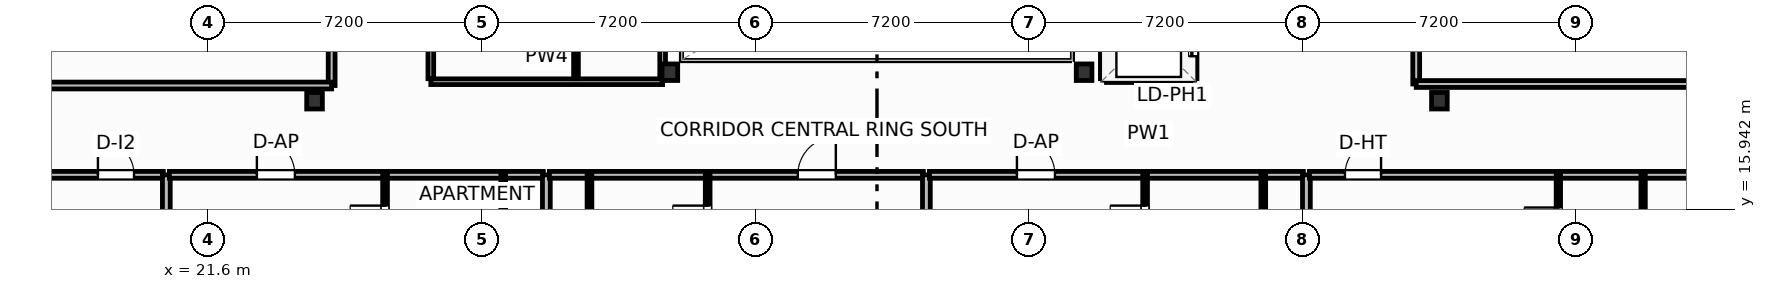
"""IFC4 building model, lengths in metres.
Left out: names, types, materials, properties, quantities, classifications, styles, units other than length and angle.
Written with IfcOpenShell. Run it as: python <this file> out.ifc"""

import sys

from ifc_helpers import new_model, si_unit, direction, frame, frame_2d, origin, origin_2d, place, context, subcontext, project, spatial, rectangle, i_section, extrude, element, fill, save


model = new_model("IFC4")
c1 = context("Model", 3, precision=1e-05, world=origin(), true_north=direction((0.0, 1.0)))
c2 = subcontext(c1, "Body", "Model", "MODEL_VIEW")
j1 = project(units=[si_unit("LENGTHUNIT", "METRE"), si_unit("PLANEANGLEUNIT", "RADIAN")], contexts=[c1])
p1 = place(None, origin())
s1 = spatial("IfcSite", under=j1, at=p1, CompositionType="ELEMENT")
p2 = place(p1, origin())
s2 = spatial("IfcBuilding", under=s1, at=p2, CompositionType="ELEMENT")
p3 = place(p2, frame((0.0, 0.0, 212.7)))
s3 = spatial("IfcBuildingStorey", under=s2, at=p3, CompositionType="ELEMENT", Elevation=212.7)
for number, where, z_axis, x_axis in (
    (1, (33.75, 19.55, 0.0), (0.0, 0.0, 1.0), (1.0, 0.0, 0.0)),
    (2, (44.65, 19.55, 0.0), (0.0, 0.0, 1.0), (1.0, 0.0, 0.0)),
    (3, (24.4, 18.8, 0.0), (0.0, 0.0, 1.0), (1.0, 0.0, 0.0)),
    (4, (54.0, 18.8, 0.0), (0.0, 0.0, 1.0), (1.0, 0.0, 0.0)),
):
    element("IfcColumn", number, at=place(p3, frame(where, z_axis=z_axis, x_axis=x_axis)), inside=s3, PredefinedType="COLUMN", context=c2, shape_type="SweptSolid", body=[
        extrude(i_section(OverallWidth=0.412, OverallDepth=0.435, WebThickness=0.036, FlangeThickness=0.057, FilletRadius=0.025, at=origin_2d()), origin(), (0.0, 0.0, 1.0), 3.7),
    ])
p4 = place(p3, frame((56.219, 9.845, 0.0), z_axis=(0.0, 0.0, 1.0), x_axis=(0.935225601791, 0.354052360188, 0.0)))
e5 = element("IfcWall", 5, at=p4, inside=s3, PredefinedType="SOLIDWALL", context=c2, shape_type="SweptSolid", body=[
    extrude(rectangle(XDim=17.647, YDim=0.22, at=frame_2d((8.824, 0.0))), origin(), (0.0, 0.0, 1.0), 2.73),
])
p5 = place(p4, frame((7.774, 0.0, 0.8)))
e6 = element("IfcOpeningElement", 6, at=p5, cuts=e5, PredefinedType="OPENING", context=c2, shape_type="SweptSolid", body=[
    extrude(rectangle(XDim=2.1, YDim=1.75, at=frame_2d((1.05, 0.875))), frame((0.0, 0.12, 0.0), z_axis=(0.0, -1.0, 0.0), x_axis=(1.0, 0.0, 0.0)), (0.0, 0.0, 1.0), 0.24),
])
p6 = place(p3, frame((7.196, 16.85, 0.0), z_axis=(0.0, 0.0, 1.0), x_axis=(1.0, 0.0, 0.0)))
e7 = element("IfcWall", 7, at=p6, inside=s3, PredefinedType="PARTITIONING", context=c2, shape_type="SweptSolid", body=[
    extrude(rectangle(XDim=13.224, YDim=0.18, at=frame_2d((6.612, 0.0))), origin(), (0.0, 0.0, 1.0), 3.45),
])
p7 = place(p6, frame((11.504, 0.0, 0.0)))
e8 = element("IfcOpeningElement", 8, at=p7, cuts=e7, PredefinedType="OPENING", context=c2, shape_type="SweptSolid", body=[
    extrude(rectangle(XDim=0.95, YDim=2.05, at=frame_2d((0.475, 1.025))), frame((0.0, 0.1, 0.0), z_axis=(0.0, -1.0, 0.0), x_axis=(1.0, 0.0, 0.0)), (0.0, 0.0, 1.0), 0.2),
])
p8 = place(p3, frame((20.5, -3.657, 0.0), z_axis=(0.0, 0.0, 1.0), x_axis=(0.0, 1.0, 0.0)))
e9 = element("IfcWall", 9, at=p8, inside=s3, PredefinedType="PARTITIONING", context=c2, shape_type="SweptSolid", body=[
    extrude(rectangle(XDim=20.507, YDim=0.205, at=frame_2d((10.253, 0.0))), origin(), (0.0, 0.0, 1.0), 3.45),
])
p9 = place(p3, frame((20.58, 16.85, 0.0), z_axis=(0.0, 0.0, 1.0), x_axis=(1.0, 0.0, 0.0)))
e10 = element("IfcWall", 10, at=p9, inside=s3, PredefinedType="PARTITIONING", context=c2, shape_type="SweptSolid", body=[
    extrude(rectangle(XDim=9.84, YDim=0.18, at=frame_2d((4.92, 0.0))), origin(), (0.0, 0.0, 1.0), 3.45),
])
p10 = place(p9, frame((2.302, 0.0, 0.0)))
e11 = element("IfcOpeningElement", 11, at=p10, cuts=e10, PredefinedType="OPENING", context=c2, shape_type="SweptSolid", body=[
    extrude(rectangle(XDim=1.0, YDim=2.2, at=frame_2d((0.5, 1.1))), frame((0.0, 0.1, 0.0), z_axis=(0.0, -1.0, 0.0), x_axis=(1.0, 0.0, 0.0)), (0.0, 0.0, 1.0), 0.2),
])
p11 = place(p3, frame((26.255, -1.478, 0.0), z_axis=(0.0, 0.0, 1.0), x_axis=(0.0, 1.0, 0.0)))
e12 = element("IfcWall", 12, at=p11, inside=s3, PredefinedType="PARTITIONING", context=c2, shape_type="SweptSolid", body=[
    extrude(rectangle(XDim=18.328, YDim=0.125, at=frame_2d((9.164, 0.0))), origin(), (0.0, 0.0, 1.0), 2.739),
])
p12 = place(p11, frame((6.319, 0.0, 0.0)))
e13 = element("IfcOpeningElement", 13, at=p12, cuts=e12, PredefinedType="OPENING", context=c2, shape_type="SweptSolid", body=[
    extrude(rectangle(XDim=0.92, YDim=2.05, at=frame_2d((0.46, 1.025))), frame((0.0, 0.073, 0.0), z_axis=(0.0, -1.0, 0.0), x_axis=(1.0, 0.0, 0.0)), (0.0, 0.0, 1.0), 0.145),
])
p13 = place(p11, frame((14.305, 0.0, 0.0)))
e14 = element("IfcOpeningElement", 14, at=p13, cuts=e12, PredefinedType="OPENING", context=c2, shape_type="SweptSolid", body=[
    extrude(rectangle(XDim=0.9, YDim=2.05, at=frame_2d((0.45, 1.025))), frame((0.0, 0.073, 0.0), z_axis=(0.0, -1.0, 0.0), x_axis=(1.0, 0.0, 0.0)), (0.0, 0.0, 1.0), 0.145),
])
p14 = place(p11, frame((16.598, 0.0, 0.0)))
e15 = element("IfcOpeningElement", 15, at=p14, cuts=e12, PredefinedType="OPENING", context=c2, shape_type="SweptSolid", body=[
    extrude(rectangle(XDim=0.92, YDim=2.05, at=frame_2d((0.46, 1.025))), frame((0.0, 0.073, 0.0), z_axis=(0.0, -1.0, 0.0), x_axis=(1.0, 0.0, 0.0)), (0.0, 0.0, 1.0), 0.145),
])
p15 = place(p3, frame((29.365, 14.44, 0.0), z_axis=(0.0, 0.0, 1.0), x_axis=(0.0, 1.0, 0.0)))
e16 = element("IfcWall", 16, at=p15, inside=s3, PredefinedType="PARTITIONING", context=c2, shape_type="SweptSolid", body=[
    extrude(rectangle(XDim=2.41, YDim=0.125, at=frame_2d((1.205, 0.0))), origin(), (0.0, 0.0, 1.0), 3.45),
])
p16 = place(p3, frame((30.5, 0.129, 0.0), z_axis=(0.0, 0.0, 1.0), x_axis=(0.0, 1.0, 0.0)))
e17 = element("IfcWall", 17, at=p16, inside=s3, PredefinedType="PARTITIONING", context=c2, shape_type="SweptSolid", body=[
    extrude(rectangle(XDim=16.721, YDim=0.205, at=frame_2d((8.36, 0.0))), origin(), (0.0, 0.0, 1.0), 3.45),
])
p17 = place(p3, frame((30.58, 16.85, 0.0), z_axis=(0.0, 0.0, 1.0), x_axis=(1.0, 0.0, 0.0)))
e18 = element("IfcWall", 18, at=p17, inside=s3, PredefinedType="PARTITIONING", context=c2, shape_type="SweptSolid", body=[
    extrude(rectangle(XDim=9.84, YDim=0.18, at=frame_2d((4.92, 0.0))), origin(), (0.0, 0.0, 1.0), 3.45),
])
p18 = place(p17, frame((6.537, 0.0, 0.0)))
e19 = element("IfcOpeningElement", 19, at=p18, cuts=e18, PredefinedType="OPENING", context=c2, shape_type="SweptSolid", body=[
    extrude(rectangle(XDim=1.0, YDim=2.2, at=frame_2d((0.5, 1.1))), frame((0.0, 0.1, 0.0), z_axis=(0.0, -1.0, 0.0), x_axis=(1.0, 0.0, 0.0)), (0.0, 0.0, 1.0), 0.2),
])
p19 = place(p3, frame((34.745, 1.736, 0.0), z_axis=(0.0, 0.0, 1.0), x_axis=(0.0, 1.0, 0.0)))
e20 = element("IfcWall", 20, at=p19, inside=s3, PredefinedType="PARTITIONING", context=c2, shape_type="SweptSolid", body=[
    extrude(rectangle(XDim=15.114, YDim=0.125, at=frame_2d((7.557, 0.0))), origin(), (0.0, 0.0, 1.0), 2.739),
])
p20 = place(p19, frame((4.712, 0.0, 0.0)))
e21 = element("IfcOpeningElement", 21, at=p20, cuts=e20, PredefinedType="OPENING", context=c2, shape_type="SweptSolid", body=[
    extrude(rectangle(XDim=0.92, YDim=2.05, at=frame_2d((0.46, 1.025))), frame((0.0, 0.073, 0.0), z_axis=(0.0, -1.0, 0.0), x_axis=(1.0, 0.0, 0.0)), (0.0, 0.0, 1.0), 0.145),
])
p21 = place(p19, frame((11.091, 0.0, 0.0)))
e22 = element("IfcOpeningElement", 22, at=p21, cuts=e20, PredefinedType="OPENING", context=c2, shape_type="SweptSolid", body=[
    extrude(rectangle(XDim=0.9, YDim=2.05, at=frame_2d((0.45, 1.025))), frame((0.0, 0.073, 0.0), z_axis=(0.0, -1.0, 0.0), x_axis=(1.0, 0.0, 0.0)), (0.0, 0.0, 1.0), 0.145),
])
p22 = place(p19, frame((13.384, 0.0, 0.0)))
e23 = element("IfcOpeningElement", 23, at=p22, cuts=e20, PredefinedType="OPENING", context=c2, shape_type="SweptSolid", body=[
    extrude(rectangle(XDim=0.92, YDim=2.05, at=frame_2d((0.46, 1.025))), frame((0.0, 0.073, 0.0), z_axis=(0.0, -1.0, 0.0), x_axis=(1.0, 0.0, 0.0)), (0.0, 0.0, 1.0), 0.145),
])
p23 = place(p3, frame((31.635, 14.44, 0.0), z_axis=(0.0, 0.0, 1.0), x_axis=(0.0, 1.0, 0.0)))
e24 = element("IfcWall", 24, at=p23, inside=s3, PredefinedType="PARTITIONING", context=c2, shape_type="SweptSolid", body=[
    extrude(rectangle(XDim=2.41, YDim=0.125, at=frame_2d((1.205, 0.0))), origin(), (0.0, 0.0, 1.0), 3.45),
])
p24 = place(p3, frame((40.5, 6.16, 0.0), z_axis=(0.0, 0.0, 1.0), x_axis=(0.0, 1.0, 0.0)))
e25 = element("IfcWall", 25, at=p24, inside=s3, PredefinedType="PARTITIONING", context=c2, shape_type="SweptSolid", body=[
    extrude(rectangle(XDim=10.69, YDim=0.205, at=frame_2d((5.345, 0.0))), origin(), (0.0, 0.0, 1.0), 3.45),
])
p25 = place(p3, frame((40.58, 16.85, 0.0), z_axis=(0.0, 0.0, 1.0), x_axis=(1.0, 0.0, 0.0)))
e26 = element("IfcWall", 26, at=p25, inside=s3, PredefinedType="PARTITIONING", context=c2, shape_type="SweptSolid", body=[
    extrude(rectangle(XDim=9.84, YDim=0.18, at=frame_2d((4.92, 0.0))), origin(), (0.0, 0.0, 1.0), 3.45),
])
p26 = place(p25, frame((2.302, 0.0, 0.0)))
e27 = element("IfcOpeningElement", 27, at=p26, cuts=e26, PredefinedType="OPENING", context=c2, shape_type="SweptSolid", body=[
    extrude(rectangle(XDim=1.0, YDim=2.2, at=frame_2d((0.5, 1.1))), frame((0.0, 0.1, 0.0), z_axis=(0.0, -1.0, 0.0), x_axis=(1.0, 0.0, 0.0)), (0.0, 0.0, 1.0), 0.2),
])
p27 = place(p3, frame((46.255, 6.094, 0.0), z_axis=(0.0, 0.0, 1.0), x_axis=(0.0, 1.0, 0.0)))
e28 = element("IfcWall", 28, at=p27, inside=s3, PredefinedType="PARTITIONING", context=c2, shape_type="SweptSolid", body=[
    extrude(rectangle(XDim=10.756, YDim=0.125, at=frame_2d((5.378, 0.0))), origin(), (0.0, 0.0, 1.0), 3.45),
])
p28 = place(p27, frame((3.003, 0.0, 0.0)))
e29 = element("IfcOpeningElement", 29, at=p28, cuts=e28, PredefinedType="OPENING", context=c2, shape_type="SweptSolid", body=[
    extrude(rectangle(XDim=0.92, YDim=2.05, at=frame_2d((0.46, 1.025))), frame((0.0, 0.073, 0.0), z_axis=(0.0, -1.0, 0.0), x_axis=(1.0, 0.0, 0.0)), (0.0, 0.0, 1.0), 0.145),
])
p29 = place(p27, frame((6.733, 0.0, 0.0)))
e30 = element("IfcOpeningElement", 30, at=p29, cuts=e28, PredefinedType="OPENING", context=c2, shape_type="SweptSolid", body=[
    extrude(rectangle(XDim=0.9, YDim=2.05, at=frame_2d((0.45, 1.025))), frame((0.0, 0.073, 0.0), z_axis=(0.0, -1.0, 0.0), x_axis=(1.0, 0.0, 0.0)), (0.0, 0.0, 1.0), 0.145),
])
p30 = place(p27, frame((9.026, 0.0, 0.0)))
e31 = element("IfcOpeningElement", 31, at=p30, cuts=e28, PredefinedType="OPENING", context=c2, shape_type="SweptSolid", body=[
    extrude(rectangle(XDim=0.92, YDim=2.05, at=frame_2d((0.46, 1.025))), frame((0.0, 0.073, 0.0), z_axis=(0.0, -1.0, 0.0), x_axis=(1.0, 0.0, 0.0)), (0.0, 0.0, 1.0), 0.145),
])
p31 = place(p3, frame((49.365, 14.44, 0.0), z_axis=(0.0, 0.0, 1.0), x_axis=(0.0, 1.0, 0.0)))
e32 = element("IfcWall", 32, at=p31, inside=s3, PredefinedType="PARTITIONING", context=c2, shape_type="SweptSolid", body=[
    extrude(rectangle(XDim=2.41, YDim=0.125, at=frame_2d((1.205, 0.0))), origin(), (0.0, 0.0, 1.0), 3.45),
])
p32 = place(p3, frame((50.5, 9.946, 0.0), z_axis=(0.0, 0.0, 1.0), x_axis=(0.0, 1.0, 0.0)))
e33 = element("IfcWall", 33, at=p32, inside=s3, PredefinedType="PARTITIONING", context=c2, shape_type="SweptSolid", body=[
    extrude(rectangle(XDim=6.904, YDim=0.205, at=frame_2d((3.452, 0.0))), origin(), (0.0, 0.0, 1.0), 3.45),
])
p33 = place(p3, frame((50.58, 16.85, 0.0), z_axis=(0.0, 0.0, 1.0), x_axis=(1.0, 0.0, 0.0)))
e34 = element("IfcWall", 34, at=p33, inside=s3, PredefinedType="PARTITIONING", context=c2, shape_type="SweptSolid", body=[
    extrude(rectangle(XDim=23.404, YDim=0.18, at=frame_2d((11.702, 0.0))), origin(), (0.0, 0.0, 1.0), 3.45),
])
p34 = place(p33, frame((0.935, 0.0, 0.0)))
e35 = element("IfcOpeningElement", 35, at=p34, cuts=e34, PredefinedType="OPENING", context=c2, shape_type="SweptSolid", body=[
    extrude(rectangle(XDim=0.95, YDim=2.15, at=frame_2d((0.475, 1.075))), frame((0.0, 0.1, 0.0), z_axis=(0.0, -1.0, 0.0), x_axis=(1.0, 0.0, 0.0)), (0.0, 0.0, 1.0), 0.2),
])
p35 = place(p3, frame((57.13, 14.33, 0.0), z_axis=(0.0, 0.0, 1.0), x_axis=(0.0, 1.0, 0.0)))
e36 = element("IfcWall", 36, at=p35, inside=s3, PredefinedType="PARTITIONING", context=c2, shape_type="SweptSolid", body=[
    extrude(rectangle(XDim=2.52, YDim=0.115, at=frame_2d((1.26, 0.0))), origin(), (0.0, 0.0, 1.0), 3.45),
])
p36 = place(p35, frame((0.76, 0.0, 0.0)))
e37 = element("IfcOpeningElement", 37, at=p36, cuts=e36, PredefinedType="OPENING", context=c2, shape_type="SweptSolid", body=[
    extrude(rectangle(XDim=0.9, YDim=2.05, at=frame_2d((0.45, 1.025))), frame((0.0, 0.067, 0.0), z_axis=(0.0, -1.0, 0.0), x_axis=(1.0, 0.0, 0.0)), (0.0, 0.0, 1.0), 0.135),
])
p37 = place(p3, frame((59.36, 14.33, 0.0), z_axis=(0.0, 0.0, 1.0), x_axis=(0.0, 1.0, 0.0)))
e38 = element("IfcWall", 38, at=p37, inside=s3, PredefinedType="PARTITIONING", context=c2, shape_type="SweptSolid", body=[
    extrude(rectangle(XDim=2.52, YDim=0.115, at=frame_2d((1.26, 0.0))), origin(), (0.0, 0.0, 1.0), 3.45),
])
p38 = place(p3, frame((24.85, 19.2, 0.0), z_axis=(0.0, 0.0, 1.0), x_axis=(0.0, 1.0, 0.0)))
e39 = element("IfcWall", 39, at=p38, inside=s3, PredefinedType="PARTITIONING", context=c2, shape_type="SweptSolid", body=[
    extrude(rectangle(XDim=7.5, YDim=0.18, at=frame_2d((3.75, 0.0))), origin(), (0.0, 0.0, 1.0), 3.45),
])
p39 = place(p38, frame((3.275, 0.0, 0.0)))
e40 = element("IfcOpeningElement", 40, at=p39, cuts=e39, PredefinedType="OPENING", context=c2, shape_type="SweptSolid", body=[
    extrude(rectangle(XDim=0.95, YDim=2.05, at=frame_2d((0.475, 1.025))), frame((0.0, 0.1, 0.0), z_axis=(0.0, -1.0, 0.0), x_axis=(1.0, 0.0, 0.0)), (0.0, 0.0, 1.0), 0.2),
])
p40 = place(p3, frame((6.306, 19.2, 0.0), z_axis=(0.0, 0.0, 1.0), x_axis=(1.0, 0.0, 0.0)))
e41 = element("IfcWall", 41, at=p40, inside=s3, PredefinedType="PARTITIONING", context=c2, shape_type="SweptSolid", body=[
    extrude(rectangle(XDim=18.544, YDim=0.18, at=frame_2d((9.272, 0.0))), origin(), (0.0, 0.0, 1.0), 3.45),
])
p41 = place(p3, frame((53.39, 19.24, 0.0), z_axis=(0.0, 0.0, 1.0), x_axis=(0.0, 1.0, 0.0)))
e42 = element("IfcWall", 42, at=p41, inside=s3, PredefinedType="PARTITIONING", context=c2, shape_type="SweptSolid", body=[
    extrude(rectangle(XDim=20.06, YDim=0.18, at=frame_2d((10.03, 0.0))), origin(), (0.0, 0.0, 1.0), 3.45),
])
p42 = place(p41, frame((7.7, 0.0, 0.0)))
e43 = element("IfcOpeningElement", 43, at=p42, cuts=e42, PredefinedType="OPENING", context=c2, shape_type="SweptSolid", body=[
    extrude(rectangle(XDim=0.95, YDim=2.05, at=frame_2d((0.475, 1.025))), frame((0.0, 0.1, 0.0), z_axis=(0.0, -1.0, 0.0), x_axis=(1.0, 0.0, 0.0)), (0.0, 0.0, 1.0), 0.2),
])
p43 = place(p3, frame((53.39, 19.24, 0.0), z_axis=(0.0, 0.0, 1.0), x_axis=(1.0, 0.0, 0.0)))
e44 = element("IfcWall", 44, at=p43, inside=s3, PredefinedType="PARTITIONING", context=c2, shape_type="SweptSolid", body=[
    extrude(rectangle(XDim=22.217, YDim=0.18, at=frame_2d((11.108, 0.0))), origin(), (0.0, 0.0, 1.0), 3.45),
])
p44 = place(p3, frame((27.46, 19.3, 0.0), z_axis=(0.0, 0.0, 1.0), x_axis=(1.0, 0.0, 0.0)))
e45 = element("IfcWall", 45, at=p44, inside=s3, PredefinedType="PARTITIONING", context=c2, shape_type="SweptSolid", body=[
    extrude(rectangle(XDim=6.1, YDim=0.15, at=frame_2d((3.05, 0.0))), origin(), (0.0, 0.0, 1.0), 2.662),
])
p45 = place(p3, frame((31.28, 19.38, 0.0), z_axis=(0.0, 0.0, 1.0), x_axis=(0.0, 1.0, 0.0)))
e46 = element("IfcWall", 46, at=p45, inside=s3, PredefinedType="PARTITIONING", context=c2, shape_type="SweptSolid", body=[
    extrude(rectangle(XDim=7.16, YDim=0.125, at=frame_2d((3.58, 0.0))), origin(), (0.0, 0.0, 1.0), 3.45),
])
p46 = place(p3, frame((27.46, 19.38, 0.0), z_axis=(0.0, 0.0, 1.0), x_axis=(0.0, 1.0, 0.0)))
e47 = element("IfcWall", 47, at=p46, inside=s3, PredefinedType="PARTITIONING", context=c2, shape_type="SweptSolid", body=[
    extrude(rectangle(XDim=7.16, YDim=0.15, at=frame_2d((3.58, 0.0))), origin(), (0.0, 0.0, 1.0), 3.45),
])
p47 = place(p46, frame((1.4, 0.0, 0.0)))
e48 = element("IfcOpeningElement", 48, at=p47, cuts=e47, PredefinedType="OPENING", context=c2, shape_type="SweptSolid", body=[
    extrude(rectangle(XDim=0.95, YDim=2.05, at=frame_2d((0.475, 1.025))), frame((0.0, 0.085, 0.0), z_axis=(0.0, -1.0, 0.0), x_axis=(1.0, 0.0, 0.0)), (0.0, 0.0, 1.0), 0.17),
])
p48 = place(p3, frame((33.56, 19.38, 0.0), z_axis=(0.0, 0.0, 1.0), x_axis=(0.0, 1.0, 0.0)))
e49 = element("IfcWall", 49, at=p48, inside=s3, PredefinedType="PARTITIONING", context=c2, shape_type="SweptSolid", body=[
    extrude(rectangle(XDim=7.16, YDim=0.15, at=frame_2d((3.58, 0.0))), origin(), (0.0, 0.0, 1.0), 2.824),
])
p49 = place(p3, frame((45.24, 19.38, 0.0), z_axis=(0.0, 0.0, 1.0), x_axis=(1.0, 0.0, 0.0)))
e50 = element("IfcWall", 50, at=p49, inside=s3, PredefinedType="PARTITIONING", context=c2, shape_type="SweptSolid", body=[
    extrude(rectangle(XDim=2.22, YDim=0.2, at=frame_2d((1.11, 0.0))), origin(), (0.0, 0.0, 1.0), 2.662),
])
p50 = place(p3, frame((45.18, 19.38, 0.0), z_axis=(0.0, 0.0, 1.0), x_axis=(0.0, 1.0, 0.0)))
e51 = element("IfcWall", 51, at=p50, inside=s3, PredefinedType="PARTITIONING", context=c2, shape_type="SweptSolid", body=[
    extrude(rectangle(XDim=6.9, YDim=0.2, at=frame_2d((3.45, 0.0))), origin(), (0.0, 0.0, 1.0), 3.45),
])
p51 = place(p3, frame((47.52, 19.38, 0.0), z_axis=(0.0, 0.0, 1.0), x_axis=(0.0, 1.0, 0.0)))
e52 = element("IfcWall", 52, at=p51, inside=s3, PredefinedType="PARTITIONING", context=c2, shape_type="SweptSolid", body=[
    extrude(rectangle(XDim=6.9, YDim=0.2, at=frame_2d((3.45, 0.0))), origin(), (0.0, 0.0, 1.0), 3.45),
])
p52 = place(p51, frame((0.59, 0.0, 0.0)))
e53 = element("IfcOpeningElement", 53, at=p52, cuts=e52, PredefinedType="OPENING", context=c2, shape_type="SweptSolid", body=[
    extrude(rectangle(XDim=1.1, YDim=2.15, at=frame_2d((0.55, 1.075))), frame((0.0, 0.11, 0.0), z_axis=(0.0, -1.0, 0.0), x_axis=(1.0, 0.0, 0.0)), (0.0, 0.0, 1.0), 0.22),
])
p53 = place(p51, frame((2.89, 0.0, 0.0)))
e54 = element("IfcOpeningElement", 54, at=p53, cuts=e52, PredefinedType="OPENING", context=c2, shape_type="SweptSolid", body=[
    extrude(rectangle(XDim=1.1, YDim=2.15, at=frame_2d((0.55, 1.075))), frame((0.0, 0.11, 0.0), z_axis=(0.0, -1.0, 0.0), x_axis=(1.0, 0.0, 0.0)), (0.0, 0.0, 1.0), 0.22),
])
p54 = place(p51, frame((5.19, 0.0, 0.0)))
e55 = element("IfcOpeningElement", 55, at=p54, cuts=e52, PredefinedType="OPENING", context=c2, shape_type="SweptSolid", body=[
    extrude(rectangle(XDim=1.1, YDim=2.15, at=frame_2d((0.55, 1.075))), frame((0.0, 0.11, 0.0), z_axis=(0.0, -1.0, 0.0), x_axis=(1.0, 0.0, 0.0)), (0.0, 0.0, 1.0), 0.22),
])
p55 = place(p7, origin())
e56 = element("IfcDoor", 56, at=p55, inside=s3, OperationType="SINGLE_SWING_LEFT", PredefinedType="DOOR", context=c2, shape_type="SweptSolid", body=[
    extrude(rectangle(XDim=0.95, YDim=2.05, at=frame_2d((0.475, 1.025))), frame((0.0, 0.025, 0.0), z_axis=(0.0, -1.0, 0.0), x_axis=(1.0, 0.0, 0.0)), (0.0, 0.0, 1.0), 0.05),
])
fill(e8, e56)
p56 = place(p10, origin())
e57 = element("IfcDoor", 57, at=p56, inside=s3, OperationType="SINGLE_SWING_LEFT", PredefinedType="DOOR", context=c2, shape_type="SweptSolid", body=[
    extrude(rectangle(XDim=1.0, YDim=2.2, at=frame_2d((0.5, 1.1))), frame((0.0, 0.025, 0.0), z_axis=(0.0, -1.0, 0.0), x_axis=(1.0, 0.0, 0.0)), (0.0, 0.0, 1.0), 0.05),
])
fill(e11, e57)
p57 = place(p14, origin())
e58 = element("IfcDoor", 58, at=p57, inside=s3, OperationType="SINGLE_SWING_RIGHT", PredefinedType="DOOR", context=c2, shape_type="SweptSolid", body=[
    extrude(rectangle(XDim=0.92, YDim=2.05, at=frame_2d((0.46, 1.025))), frame((0.0, 0.025, 0.0), z_axis=(0.0, -1.0, 0.0), x_axis=(1.0, 0.0, 0.0)), (0.0, 0.0, 1.0), 0.05),
])
fill(e15, e58)
p58 = place(p18, origin())
e59 = element("IfcDoor", 59, at=p58, inside=s3, OperationType="SINGLE_SWING_RIGHT", PredefinedType="DOOR", context=c2, shape_type="SweptSolid", body=[
    extrude(rectangle(XDim=1.0, YDim=2.2, at=frame_2d((0.5, 1.1))), frame((0.0, 0.025, 0.0), z_axis=(0.0, -1.0, 0.0), x_axis=(1.0, 0.0, 0.0)), (0.0, 0.0, 1.0), 0.05),
])
fill(e19, e59)
p59 = place(p22, origin())
e60 = element("IfcDoor", 60, at=p59, inside=s3, OperationType="SINGLE_SWING_RIGHT", PredefinedType="DOOR", context=c2, shape_type="SweptSolid", body=[
    extrude(rectangle(XDim=0.92, YDim=2.05, at=frame_2d((0.46, 1.025))), frame((0.0, 0.025, 0.0), z_axis=(0.0, -1.0, 0.0), x_axis=(1.0, 0.0, 0.0)), (0.0, 0.0, 1.0), 0.05),
])
fill(e23, e60)
p60 = place(p26, origin())
e61 = element("IfcDoor", 61, at=p60, inside=s3, OperationType="SINGLE_SWING_LEFT", PredefinedType="DOOR", context=c2, shape_type="SweptSolid", body=[
    extrude(rectangle(XDim=1.0, YDim=2.2, at=frame_2d((0.5, 1.1))), frame((0.0, 0.025, 0.0), z_axis=(0.0, -1.0, 0.0), x_axis=(1.0, 0.0, 0.0)), (0.0, 0.0, 1.0), 0.05),
])
fill(e27, e61)
p61 = place(p30, origin())
e62 = element("IfcDoor", 62, at=p61, inside=s3, OperationType="SINGLE_SWING_RIGHT", PredefinedType="DOOR", context=c2, shape_type="SweptSolid", body=[
    extrude(rectangle(XDim=0.92, YDim=2.05, at=frame_2d((0.46, 1.025))), frame((0.0, 0.025, 0.0), z_axis=(0.0, -1.0, 0.0), x_axis=(1.0, 0.0, 0.0)), (0.0, 0.0, 1.0), 0.05),
])
fill(e31, e62)
p62 = place(p34, origin())
e63 = element("IfcDoor", 63, at=p62, inside=s3, OperationType="SINGLE_SWING_RIGHT", PredefinedType="DOOR", context=c2, shape_type="SweptSolid", body=[
    extrude(rectangle(XDim=0.95, YDim=2.15, at=frame_2d((0.475, 1.075))), frame((0.0, 0.025, 0.0), z_axis=(0.0, -1.0, 0.0), x_axis=(1.0, 0.0, 0.0)), (0.0, 0.0, 1.0), 0.05),
])
fill(e35, e63)
p63 = place(p36, origin())
e64 = element("IfcDoor", 64, at=p63, inside=s3, OperationType="SINGLE_SWING_RIGHT", PredefinedType="DOOR", context=c2, shape_type="SweptSolid", body=[
    extrude(rectangle(XDim=0.9, YDim=2.05, at=frame_2d((0.45, 1.025))), frame((0.0, 0.025, 0.0), z_axis=(0.0, -1.0, 0.0), x_axis=(1.0, 0.0, 0.0)), (0.0, 0.0, 1.0), 0.05),
])
fill(e37, e64)
p64 = place(p52, origin())
e65 = element("IfcDoor", 65, at=p64, inside=s3, OperationType="SLIDING_TO_LEFT", PredefinedType="DOOR", context=c2, shape_type="SweptSolid", body=[
    extrude(rectangle(XDim=1.1, YDim=2.15, at=frame_2d((0.55, 1.075))), frame((0.0, 0.025, 0.0), z_axis=(0.0, -1.0, 0.0), x_axis=(1.0, 0.0, 0.0)), (0.0, 0.0, 1.0), 0.05),
])
fill(e53, e65)
save(model, sys.argv[1])
